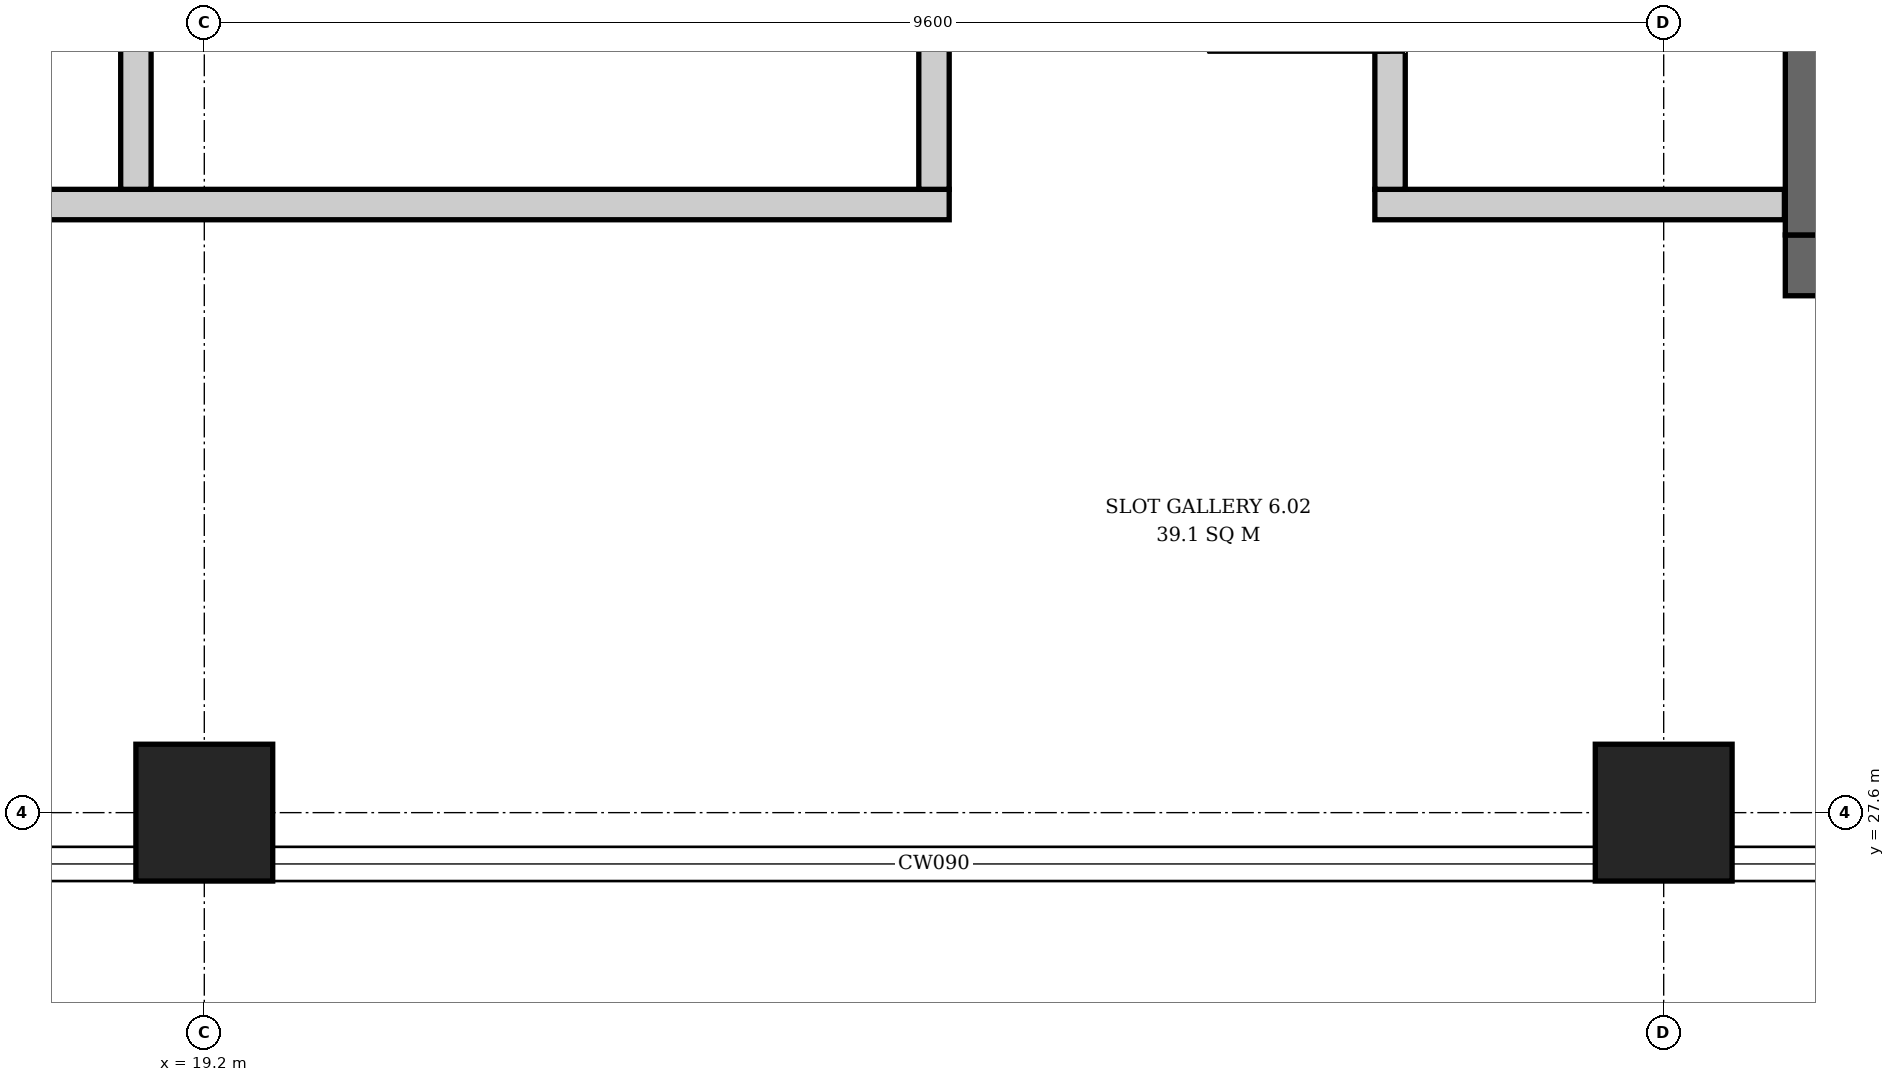
"""IFC4 building model, lengths in metres.
Left out: names, types, materials, properties, quantities, classifications, styles, units other than length and angle.
Written with IfcOpenShell. Run it as: python <this file> out.ifc"""

import sys

from ifc_helpers import new_model, si_unit, direction, frame, frame_2d, origin, origin_2d, place, context, subcontext, project, spatial, rectangle, extrude, element, fill, save


model = new_model("IFC4")
c1 = context("Model", 3, precision=1e-05, world=origin(), true_north=direction((0.0, 1.0)))
c2 = subcontext(c1, "Body", "Model", "MODEL_VIEW")
j1 = project(units=[si_unit("LENGTHUNIT", "METRE"), si_unit("PLANEANGLEUNIT", "RADIAN")], contexts=[c1])
p1 = place(None, origin())
s1 = spatial("IfcSite", under=j1, at=p1, CompositionType="ELEMENT")
p2 = place(p1, origin())
s2 = spatial("IfcBuilding", under=s1, at=p2, CompositionType="ELEMENT")
p3 = place(p2, frame((0.0, 0.0, 36.1)))
s3 = spatial("IfcBuildingStorey", under=s2, at=p3, CompositionType="ELEMENT", Elevation=36.1)
p4 = place(p3, frame((29.6, 31.2, 0.0), z_axis=(0.0, 0.0, 1.0), x_axis=(1.0, 0.0, 0.0)))
e1 = element("IfcWall", 1, at=p4, inside=s3, PredefinedType="SHEAR", context=c2, shape_type="SweptSolid", body=[
    extrude(rectangle(XDim=2.9, YDim=0.4, at=frame_2d((1.45, 0.0))), origin(), (0.0, 0.0, 1.0), 4.2),
])
p5 = place(p4, frame((0.9, 0.0, 0.0)))
e2 = element("IfcOpeningElement", 2, at=p5, cuts=e1, PredefinedType="OPENING", context=c2, shape_type="SweptSolid", body=[
    extrude(rectangle(XDim=1.1, YDim=2.1, at=frame_2d((0.55, 1.05))), frame((0.0, 0.21, 0.0), z_axis=(0.0, -1.0, 0.0), x_axis=(1.0, 0.0, 0.0)), (0.0, 0.0, 1.0), 0.42),
])
p6 = place(p3, frame((29.8, 31.4, 0.0), z_axis=(0.0, 0.0, 1.0), x_axis=(0.0, 1.0, 0.0)))
e3 = element("IfcWall", 3, at=p6, inside=s3, PredefinedType="SHEAR", context=c2, shape_type="SweptSolid", body=[
    extrude(rectangle(XDim=3.0, YDim=0.4, at=frame_2d((1.5, 0.0))), origin(), (0.0, 0.0, 1.0), 4.2),
])
for number, where, z_axis, x_axis in (
    (4, (19.2, 27.6, 0.0), (0.0, 0.0, 1.0), (1.0, 0.0, 0.0)),
    (5, (28.8, 27.6, 0.0), (0.0, 0.0, 1.0), (1.0, 0.0, 0.0)),
):
    element("IfcColumn", number, at=place(p3, frame(where, z_axis=z_axis, x_axis=x_axis)), inside=s3, PredefinedType="COLUMN", context=c2, shape_type="SweptSolid", body=[
        extrude(rectangle(XDim=0.9, YDim=0.9, at=origin_2d()), origin(), (0.0, 0.0, 1.0), 4.2),
    ])
p7 = place(p3, frame((13.506, 31.6, 0.0), z_axis=(0.0, 0.0, 1.0), x_axis=(1.0, 0.0, 0.0)))
e6 = element("IfcWall", 6, at=p7, inside=s3, PredefinedType="PARTITIONING", context=c2, shape_type="SweptSolid", body=[
    extrude(rectangle(XDim=10.594, YDim=0.2, at=frame_2d((5.297, 0.0))), origin(), (0.0, 0.0, 1.0), 3.9),
])
for number, where, z_axis, x_axis in (
    (7, (18.75, 31.7, 0.0), (0.0, 0.0, 1.0), (0.0, 1.0, 0.0)),
    (8, (24.0, 31.7, 0.0), (0.0, 0.0, 1.0), (0.0, 1.0, 0.0)),
):
    element("IfcWall", number, at=place(p3, frame(where, z_axis=z_axis, x_axis=x_axis)), inside=s3, PredefinedType="PARTITIONING", context=c2, shape_type="SweptSolid", body=[
        extrude(rectangle(XDim=3.0, YDim=0.2, at=frame_2d((1.5, 0.0))), origin(), (0.0, 0.0, 1.0), 3.9),
    ])
p8 = place(p3, frame((26.9, 31.6, 0.0), z_axis=(0.0, 0.0, 1.0), x_axis=(1.0, 0.0, 0.0)))
e9 = element("IfcWall", 9, at=p8, inside=s3, PredefinedType="PARTITIONING", context=c2, shape_type="SweptSolid", body=[
    extrude(rectangle(XDim=2.694, YDim=0.2, at=frame_2d((1.347, 0.0))), origin(), (0.0, 0.0, 1.0), 3.9),
])
p9 = place(p3, frame((27.0, 31.7, 0.0), z_axis=(0.0, 0.0, 1.0), x_axis=(0.0, 1.0, 0.0)))
e10 = element("IfcWall", 10, at=p9, inside=s3, PredefinedType="PARTITIONING", context=c2, shape_type="SweptSolid", body=[
    extrude(rectangle(XDim=3.0, YDim=0.2, at=frame_2d((1.5, 0.0))), origin(), (0.0, 0.0, 1.0), 3.9),
])
p10 = place(p9, frame((0.9, 0.0, 0.0)))
e11 = element("IfcOpeningElement", 11, at=p10, cuts=e10, PredefinedType="OPENING", context=c2, shape_type="SweptSolid", body=[
    extrude(rectangle(XDim=1.2, YDim=2.1, at=frame_2d((0.6, 1.05))), frame((0.0, 0.11, 0.0), z_axis=(0.0, -1.0, 0.0), x_axis=(1.0, 0.0, 0.0)), (0.0, 0.0, 1.0), 0.22),
])
p11 = place(p10, origin())
e12 = element("IfcDoor", 12, at=p11, inside=s3, OperationType="SINGLE_SWING_RIGHT", PredefinedType="DOOR", context=c2, shape_type="SweptSolid", body=[
    extrude(rectangle(XDim=1.2, YDim=2.1, at=frame_2d((0.6, 1.05))), frame((0.0, 0.025, 0.0), z_axis=(0.0, -1.0, 0.0), x_axis=(1.0, 0.0, 0.0)), (0.0, 0.0, 1.0), 0.05),
])
fill(e11, e12)
save(model, sys.argv[1])
